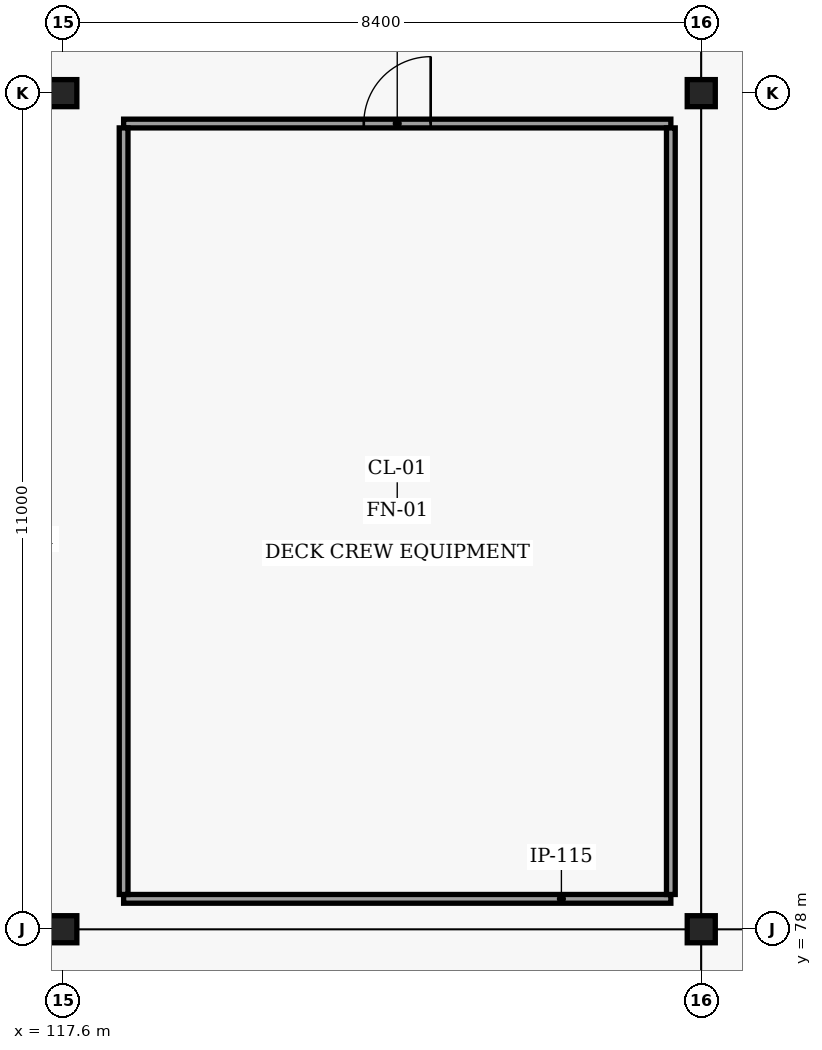
"""IFC4 building model, lengths in metres.
Left out: names, types, materials, properties, quantities, classifications, styles, units other than length and angle.
Written with IfcOpenShell. Run it as: python <this file> out.ifc"""

import sys

from ifc_helpers import new_model, si_unit, direction, frame, frame_2d, origin, origin_2d, place, context, subcontext, project, spatial, rectangle, i_section, extrude, element, fill, save


model = new_model("IFC4")
c1 = context("Model", 3, precision=1e-05, world=origin(), true_north=direction((0.0, 1.0)))
c2 = subcontext(c1, "Body", "Model", "MODEL_VIEW")
j1 = project(units=[si_unit("LENGTHUNIT", "METRE"), si_unit("PLANEANGLEUNIT", "RADIAN")], contexts=[c1])
p1 = place(None, origin())
s1 = spatial("IfcSite", under=j1, at=p1, CompositionType="ELEMENT")
p2 = place(p1, origin())
s2 = spatial("IfcBuilding", under=s1, at=p2, CompositionType="ELEMENT")
p3 = place(p2, frame((0.0, 0.0, 5.4)))
s3 = spatial("IfcBuildingStorey", under=s2, at=p3, CompositionType="ELEMENT", Elevation=5.4)
for number, where, z_axis, x_axis in (
    (1, (117.6, 78.0, 0.0), (0.0, 0.0, 1.0), (1.0, 0.0, 0.0)),
    (2, (126.0, 78.0, 0.0), (0.0, 0.0, 1.0), (1.0, 0.0, 0.0)),
    (3, (117.6, 89.0, 0.0), (0.0, 0.0, 1.0), (1.0, 0.0, 0.0)),
    (4, (126.0, 89.0, 0.0), (0.0, 0.0, 1.0), (1.0, 0.0, 0.0)),
):
    element("IfcColumn", number, at=place(p3, frame(where, z_axis=z_axis, x_axis=x_axis)), inside=s3, PredefinedType="COLUMN", context=c2, shape_type="SweptSolid", body=[
        extrude(i_section(OverallWidth=0.369, OverallDepth=0.356, WebThickness=0.011, FlangeThickness=0.018, FilletRadius=0.015, at=origin_2d()), origin(), (0.0, 0.0, 1.0), 4.5),
    ])
p4 = place(p3, frame((118.4, 78.4, 0.0), z_axis=(0.0, 0.0, 1.0), x_axis=(1.0, 0.0, 0.0)))
e5 = element("IfcWall", 5, at=p4, inside=s3, PredefinedType="PARTITIONING", context=c2, shape_type="SweptSolid", body=[
    extrude(rectangle(XDim=7.2, YDim=0.115, at=frame_2d((3.6, 0.0))), origin(), (0.0, 0.0, 1.0), 4.5),
])
p5 = place(p3, frame((118.4, 88.6, 0.0), z_axis=(0.0, 0.0, 1.0), x_axis=(1.0, 0.0, 0.0)))
e6 = element("IfcWall", 6, at=p5, inside=s3, PredefinedType="PARTITIONING", context=c2, shape_type="SweptSolid", body=[
    extrude(rectangle(XDim=7.2, YDim=0.115, at=frame_2d((3.6, 0.0))), origin(), (0.0, 0.0, 1.0), 4.5),
])
p6 = place(p5, frame((3.16, 0.0, 0.0)))
e7 = element("IfcOpeningElement", 7, at=p6, cuts=e6, PredefinedType="OPENING", context=c2, shape_type="SweptSolid", body=[
    extrude(rectangle(XDim=0.88, YDim=2.05, at=frame_2d((0.44, 1.025))), frame((0.0, 0.067, 0.0), z_axis=(0.0, -1.0, 0.0), x_axis=(1.0, 0.0, 0.0)), (0.0, 0.0, 1.0), 0.135),
])
for number, where, z_axis, x_axis in (
    (8, (118.4, 78.458, 0.0), (0.0, 0.0, 1.0), (0.0, 1.0, 0.0)),
    (9, (125.6, 78.458, 0.0), (0.0, 0.0, 1.0), (0.0, 1.0, 0.0)),
):
    element("IfcWall", number, at=place(p3, frame(where, z_axis=z_axis, x_axis=x_axis)), inside=s3, PredefinedType="PARTITIONING", context=c2, shape_type="SweptSolid", body=[
        extrude(rectangle(XDim=10.085, YDim=0.115, at=frame_2d((5.042, 0.0))), origin(), (0.0, 0.0, 1.0), 4.187),
    ])
p7 = place(p6, origin())
e10 = element("IfcDoor", 10, at=p7, inside=s3, OperationType="SINGLE_SWING_RIGHT", PredefinedType="DOOR", context=c2, shape_type="SweptSolid", body=[
    extrude(rectangle(XDim=0.88, YDim=2.05, at=frame_2d((0.44, 1.025))), frame((0.0, 0.025, 0.0), z_axis=(0.0, -1.0, 0.0), x_axis=(1.0, 0.0, 0.0)), (0.0, 0.0, 1.0), 0.05),
])
fill(e7, e10)
save(model, sys.argv[1])
